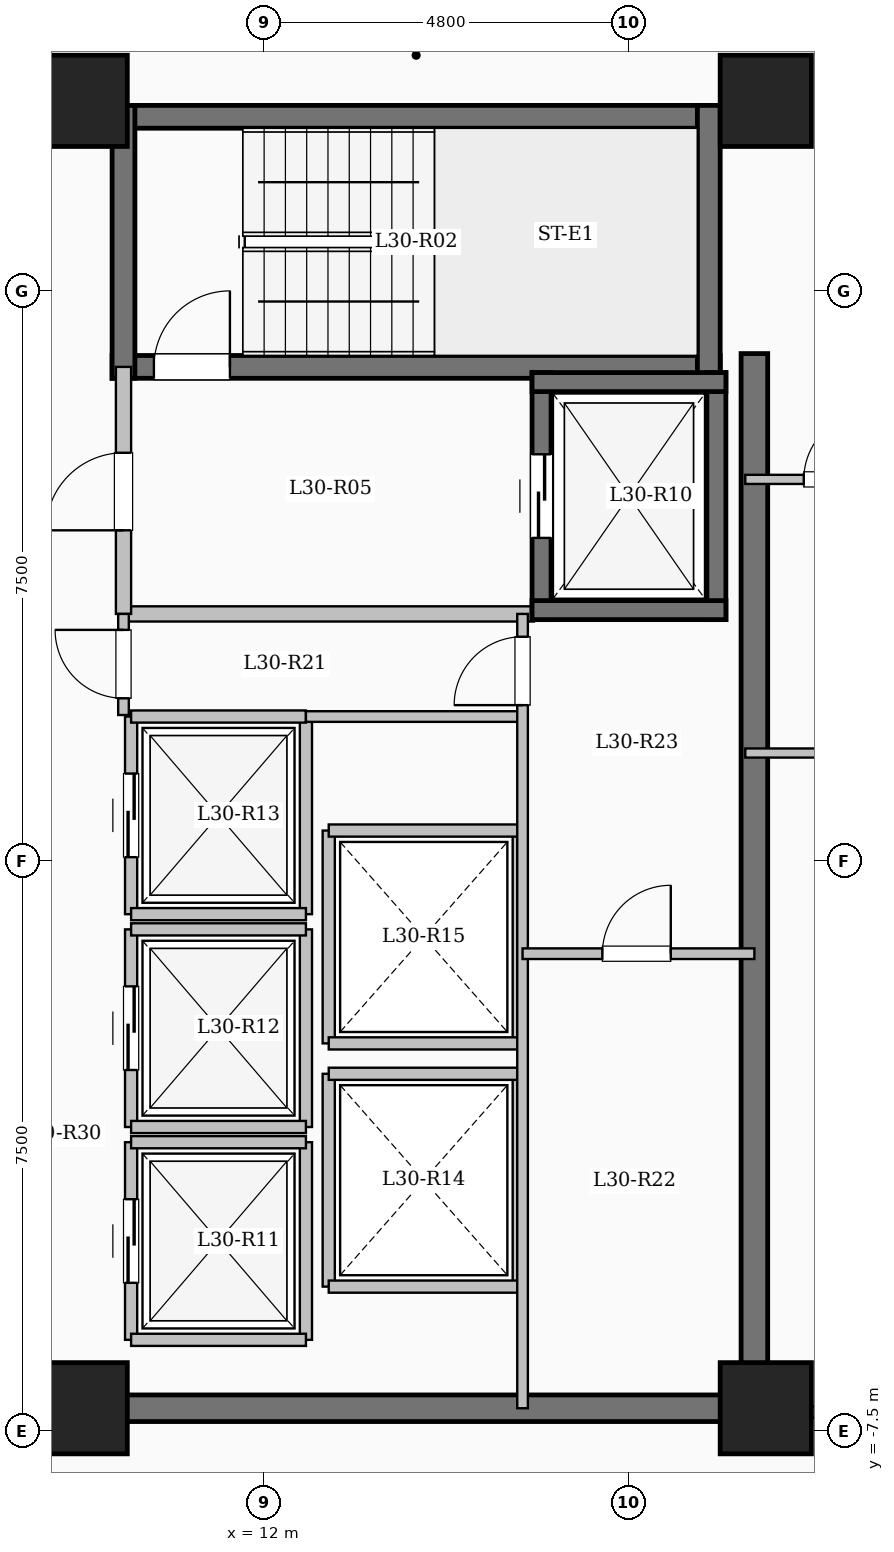
"""IFC4 building model, lengths in metres.
Left out: names, types, materials, properties, quantities, classifications, styles, units other than length and angle.
Written with IfcOpenShell. Run it as: python <this file> out.ifc"""

import sys

from ifc_helpers import new_model, si_unit, direction, frame, frame_2d, origin, origin_2d, place, context, subcontext, project, spatial, rectangle, extrude, element, fill, save


model = new_model("IFC4")
c1 = context("Model", 3, precision=1e-05, world=origin(), true_north=direction((0.0, 1.0)))
c2 = subcontext(c1, "Body", "Model", "MODEL_VIEW")
j1 = project(units=[si_unit("LENGTHUNIT", "METRE"), si_unit("PLANEANGLEUNIT", "RADIAN")], contexts=[c1])
p1 = place(None, origin())
s1 = spatial("IfcSite", under=j1, at=p1, CompositionType="ELEMENT")
p2 = place(p1, origin())
s2 = spatial("IfcBuilding", under=s1, at=p2, CompositionType="ELEMENT")
p3 = place(p2, frame((0.0, 0.0, 111.8)))
s3 = spatial("IfcBuildingStorey", under=s2, at=p3, CompositionType="ELEMENT", Elevation=111.8)
for number, where, z_axis, x_axis in (
    (1, (9.6, -7.2, 0.0), (0.0, 0.0, 1.0), (1.0, 0.0, 0.0)),
    (2, (9.6, 10.0, 0.0), (0.0, 0.0, 1.0), (1.0, 0.0, 0.0)),
    (3, (18.6, -7.2, 0.0), (0.0, 0.0, 1.0), (1.0, 0.0, 0.0)),
    (4, (18.6, 10.0, 0.0), (0.0, 0.0, 1.0), (1.0, 0.0, 0.0)),
):
    element("IfcColumn", number, at=place(p3, frame(where, z_axis=z_axis, x_axis=x_axis)), inside=s3, PredefinedType="COLUMN", context=c2, shape_type="SweptSolid", body=[
        extrude(rectangle(XDim=1.2, YDim=1.2, at=origin_2d()), origin(), (0.0, 0.0, 1.0), 3.35),
    ])
p4 = place(p3, frame((10.0, 9.79, 0.0), z_axis=(0.0, 0.0, 1.0), x_axis=(1.0, 0.0, 0.0)))
e5 = element("IfcWall", 5, at=p4, inside=s3, PredefinedType="SHEAR", context=c2, shape_type="SweptSolid", body=[
    extrude(rectangle(XDim=8.0, YDim=0.3, at=frame_2d((4.0, 0.0))), origin(), (0.0, 0.0, 1.0), 3.35),
])
p5 = place(p3, frame((10.0, 6.5, 0.0), z_axis=(0.0, 0.0, 1.0), x_axis=(1.0, 0.0, 0.0)))
e6 = element("IfcWall", 6, at=p5, inside=s3, PredefinedType="SHEAR", context=c2, shape_type="SweptSolid", body=[
    extrude(rectangle(XDim=8.0, YDim=0.3, at=frame_2d((4.0, 0.0))), origin(), (0.0, 0.0, 1.0), 3.35),
])
p6 = place(p5, frame((0.55, 0.0, 0.0)))
e7 = element("IfcOpeningElement", 7, at=p6, cuts=e6, PredefinedType="OPENING", context=c2, shape_type="SweptSolid", body=[
    extrude(rectangle(XDim=1.0, YDim=2.15, at=frame_2d((0.5, 1.075))), frame((0.0, 0.16, 0.0), z_axis=(0.0, -1.0, 0.0), x_axis=(1.0, 0.0, 0.0)), (0.0, 0.0, 1.0), 0.32),
])
for number, where, z_axis, x_axis in (
    (8, (10.15, 6.35, 0.0), (0.0, 0.0, 1.0), (0.0, 1.0, 0.0)),
    (9, (17.85, 6.35, 0.0), (0.0, 0.0, 1.0), (0.0, 1.0, 0.0)),
):
    element("IfcWall", number, at=place(p3, frame(where, z_axis=z_axis, x_axis=x_axis)), inside=s3, PredefinedType="SHEAR", context=c2, shape_type="SweptSolid", body=[
        extrude(rectangle(XDim=3.59, YDim=0.3, at=frame_2d((1.795, 0.0))), origin(), (0.0, 0.0, 1.0), 3.35),
    ])
p7 = place(p3, frame((10.15, 3.25, 0.0), z_axis=(0.0, 0.0, 1.0), x_axis=(1.0, 0.0, 0.0)))
e10 = element("IfcWall", 10, at=p7, inside=s3, PredefinedType="SOLIDWALL", context=c2, shape_type="SweptSolid", body=[
    extrude(rectangle(XDim=5.4, YDim=0.2, at=frame_2d((2.7, 0.0))), origin(), (0.0, 0.0, 1.0), 3.1),
])
p8 = place(p3, frame((10.15, 3.25, 0.0), z_axis=(0.0, 0.0, 1.0), x_axis=(0.0, 1.0, 0.0)))
e11 = element("IfcWall", 11, at=p8, inside=s3, PredefinedType="SOLIDWALL", context=c2, shape_type="SweptSolid", body=[
    extrude(rectangle(XDim=3.25, YDim=0.2, at=frame_2d((1.625, 0.0))), origin(), (0.0, 0.0, 1.0), 3.1),
])
p9 = place(p8, frame((1.1, 0.0, 0.0)))
e12 = element("IfcOpeningElement", 12, at=p9, cuts=e11, PredefinedType="OPENING", context=c2, shape_type="SweptSolid", body=[
    extrude(rectangle(XDim=1.02, YDim=2.15, at=frame_2d((0.51, 1.075))), frame((0.0, 0.11, 0.0), z_axis=(0.0, -1.0, 0.0), x_axis=(1.0, 0.0, 0.0)), (0.0, 0.0, 1.0), 0.22),
])
p10 = place(p3, frame((15.65, 3.175, 0.0), z_axis=(0.0, 0.0, 1.0), x_axis=(0.0, 1.0, 0.0)))
e13 = element("IfcWall", 13, at=p10, inside=s3, PredefinedType="SHEAR", context=c2, shape_type="SweptSolid", body=[
    extrude(rectangle(XDim=3.25, YDim=0.25, at=frame_2d((1.625, 0.0))), origin(), (0.0, 0.0, 1.0), 3.35),
])
p11 = place(p10, frame((1.075, 0.0, 0.0)))
e14 = element("IfcOpeningElement", 14, at=p11, cuts=e13, PredefinedType="OPENING", context=c2, shape_type="SweptSolid", body=[
    extrude(rectangle(XDim=1.1, YDim=2.15, at=frame_2d((0.55, 1.075))), frame((0.0, 0.135, 0.0), z_axis=(0.0, -1.0, 0.0), x_axis=(1.0, 0.0, 0.0)), (0.0, 0.0, 1.0), 0.27),
])
p12 = place(p3, frame((17.95, 3.175, 0.0), z_axis=(0.0, 0.0, 1.0), x_axis=(0.0, 1.0, 0.0)))
e15 = element("IfcWall", 15, at=p12, inside=s3, PredefinedType="SHEAR", context=c2, shape_type="SweptSolid", body=[
    extrude(rectangle(XDim=3.25, YDim=0.25, at=frame_2d((1.625, 0.0))), origin(), (0.0, 0.0, 1.0), 3.35),
])
for number, where, z_axis, x_axis in (
    (16, (15.525, 3.3, 0.0), (0.0, 0.0, 1.0), (1.0, 0.0, 0.0)),
    (17, (15.525, 6.3, 0.0), (0.0, 0.0, 1.0), (1.0, 0.0, 0.0)),
):
    element("IfcWall", number, at=place(p3, frame(where, z_axis=z_axis, x_axis=x_axis)), inside=s3, PredefinedType="SHEAR", context=c2, shape_type="SweptSolid", body=[
        extrude(rectangle(XDim=2.55, YDim=0.25, at=frame_2d((1.275, 0.0))), origin(), (0.0, 0.0, 1.0), 3.35),
    ])
p13 = place(p3, frame((10.25, -6.3, 0.0), z_axis=(0.0, 0.0, 1.0), x_axis=(0.0, 1.0, 0.0)))
e18 = element("IfcWall", 18, at=p13, inside=s3, PredefinedType="SOLIDWALL", context=c2, shape_type="SweptSolid", body=[
    extrude(rectangle(XDim=2.6, YDim=0.16, at=frame_2d((1.3, 0.0))), origin(), (0.0, 0.0, 1.0), 3.1),
])
p14 = place(p13, frame((0.75, 0.0, 0.0)))
e19 = element("IfcOpeningElement", 19, at=p14, cuts=e18, PredefinedType="OPENING", context=c2, shape_type="SweptSolid", body=[
    extrude(rectangle(XDim=1.1, YDim=2.15, at=frame_2d((0.55, 1.075))), frame((0.0, 0.09, 0.0), z_axis=(0.0, -1.0, 0.0), x_axis=(1.0, 0.0, 0.0)), (0.0, 0.0, 1.0), 0.18),
])
p15 = place(p3, frame((12.55, -6.3, 0.0), z_axis=(0.0, 0.0, 1.0), x_axis=(0.0, 1.0, 0.0)))
e20 = element("IfcWall", 20, at=p15, inside=s3, PredefinedType="SOLIDWALL", context=c2, shape_type="SweptSolid", body=[
    extrude(rectangle(XDim=2.6, YDim=0.16, at=frame_2d((1.3, 0.0))), origin(), (0.0, 0.0, 1.0), 3.1),
])
for number, where, z_axis, x_axis in (
    (21, (10.25, -6.3, 0.0), (0.0, 0.0, 1.0), (1.0, 0.0, 0.0)),
    (22, (10.25, -3.7, 0.0), (0.0, 0.0, 1.0), (1.0, 0.0, 0.0)),
):
    element("IfcWall", number, at=place(p3, frame(where, z_axis=z_axis, x_axis=x_axis)), inside=s3, PredefinedType="SOLIDWALL", context=c2, shape_type="SweptSolid", body=[
        extrude(rectangle(XDim=2.3, YDim=0.16, at=frame_2d((1.15, 0.0))), origin(), (0.0, 0.0, 1.0), 3.1),
    ])
p16 = place(p3, frame((10.25, -3.5, 0.0), z_axis=(0.0, 0.0, 1.0), x_axis=(0.0, 1.0, 0.0)))
e23 = element("IfcWall", 23, at=p16, inside=s3, PredefinedType="SOLIDWALL", context=c2, shape_type="SweptSolid", body=[
    extrude(rectangle(XDim=2.6, YDim=0.16, at=frame_2d((1.3, 0.0))), origin(), (0.0, 0.0, 1.0), 3.1),
])
p17 = place(p16, frame((0.75, 0.0, 0.0)))
e24 = element("IfcOpeningElement", 24, at=p17, cuts=e23, PredefinedType="OPENING", context=c2, shape_type="SweptSolid", body=[
    extrude(rectangle(XDim=1.1, YDim=2.15, at=frame_2d((0.55, 1.075))), frame((0.0, 0.09, 0.0), z_axis=(0.0, -1.0, 0.0), x_axis=(1.0, 0.0, 0.0)), (0.0, 0.0, 1.0), 0.18),
])
p18 = place(p3, frame((12.55, -3.5, 0.0), z_axis=(0.0, 0.0, 1.0), x_axis=(0.0, 1.0, 0.0)))
e25 = element("IfcWall", 25, at=p18, inside=s3, PredefinedType="SOLIDWALL", context=c2, shape_type="SweptSolid", body=[
    extrude(rectangle(XDim=2.6, YDim=0.16, at=frame_2d((1.3, 0.0))), origin(), (0.0, 0.0, 1.0), 3.1),
])
for number, where, z_axis, x_axis in (
    (26, (10.25, -3.5, 0.0), (0.0, 0.0, 1.0), (1.0, 0.0, 0.0)),
    (27, (10.25, -0.9, 0.0), (0.0, 0.0, 1.0), (1.0, 0.0, 0.0)),
):
    element("IfcWall", number, at=place(p3, frame(where, z_axis=z_axis, x_axis=x_axis)), inside=s3, PredefinedType="SOLIDWALL", context=c2, shape_type="SweptSolid", body=[
        extrude(rectangle(XDim=2.3, YDim=0.16, at=frame_2d((1.15, 0.0))), origin(), (0.0, 0.0, 1.0), 3.1),
    ])
p19 = place(p3, frame((10.25, -0.7, 0.0), z_axis=(0.0, 0.0, 1.0), x_axis=(0.0, 1.0, 0.0)))
e28 = element("IfcWall", 28, at=p19, inside=s3, PredefinedType="SOLIDWALL", context=c2, shape_type="SweptSolid", body=[
    extrude(rectangle(XDim=2.6, YDim=0.16, at=frame_2d((1.3, 0.0))), origin(), (0.0, 0.0, 1.0), 3.1),
])
p20 = place(p19, frame((0.75, 0.0, 0.0)))
e29 = element("IfcOpeningElement", 29, at=p20, cuts=e28, PredefinedType="OPENING", context=c2, shape_type="SweptSolid", body=[
    extrude(rectangle(XDim=1.1, YDim=2.15, at=frame_2d((0.55, 1.075))), frame((0.0, 0.09, 0.0), z_axis=(0.0, -1.0, 0.0), x_axis=(1.0, 0.0, 0.0)), (0.0, 0.0, 1.0), 0.18),
])
p21 = place(p3, frame((12.55, -0.7, 0.0), z_axis=(0.0, 0.0, 1.0), x_axis=(0.0, 1.0, 0.0)))
e30 = element("IfcWall", 30, at=p21, inside=s3, PredefinedType="SOLIDWALL", context=c2, shape_type="SweptSolid", body=[
    extrude(rectangle(XDim=2.6, YDim=0.16, at=frame_2d((1.3, 0.0))), origin(), (0.0, 0.0, 1.0), 3.1),
])
for number, where, z_axis, x_axis in (
    (31, (10.25, -0.7, 0.0), (0.0, 0.0, 1.0), (1.0, 0.0, 0.0)),
    (32, (10.25, 1.9, 0.0), (0.0, 0.0, 1.0), (1.0, 0.0, 0.0)),
):
    element("IfcWall", number, at=place(p3, frame(where, z_axis=z_axis, x_axis=x_axis)), inside=s3, PredefinedType="SOLIDWALL", context=c2, shape_type="SweptSolid", body=[
        extrude(rectangle(XDim=2.3, YDim=0.16, at=frame_2d((1.15, 0.0))), origin(), (0.0, 0.0, 1.0), 3.1),
    ])
for number, where, z_axis, x_axis in (
    (33, (12.85, -5.6, 0.0), (0.0, 0.0, 1.0), (0.0, 1.0, 0.0)),
    (34, (15.35, -5.6, 0.0), (0.0, 0.0, 1.0), (0.0, 1.0, 0.0)),
):
    element("IfcWall", number, at=place(p3, frame(where, z_axis=z_axis, x_axis=x_axis)), inside=s3, PredefinedType="SOLIDWALL", context=c2, shape_type="SweptSolid", body=[
        extrude(rectangle(XDim=2.8, YDim=0.16, at=frame_2d((1.4, 0.0))), origin(), (0.0, 0.0, 1.0), 3.1),
    ])
for number, where, z_axis, x_axis in (
    (35, (12.85, -5.6, 0.0), (0.0, 0.0, 1.0), (1.0, 0.0, 0.0)),
    (36, (12.85, -2.8, 0.0), (0.0, 0.0, 1.0), (1.0, 0.0, 0.0)),
):
    element("IfcWall", number, at=place(p3, frame(where, z_axis=z_axis, x_axis=x_axis)), inside=s3, PredefinedType="SOLIDWALL", context=c2, shape_type="SweptSolid", body=[
        extrude(rectangle(XDim=2.5, YDim=0.16, at=frame_2d((1.25, 0.0))), origin(), (0.0, 0.0, 1.0), 3.1),
    ])
for number, where, z_axis, x_axis in (
    (37, (12.85, -2.4, 0.0), (0.0, 0.0, 1.0), (0.0, 1.0, 0.0)),
    (38, (15.35, -2.4, 0.0), (0.0, 0.0, 1.0), (0.0, 1.0, 0.0)),
):
    element("IfcWall", number, at=place(p3, frame(where, z_axis=z_axis, x_axis=x_axis)), inside=s3, PredefinedType="SOLIDWALL", context=c2, shape_type="SweptSolid", body=[
        extrude(rectangle(XDim=2.8, YDim=0.16, at=frame_2d((1.4, 0.0))), origin(), (0.0, 0.0, 1.0), 3.1),
    ])
for number, where, z_axis, x_axis in (
    (39, (12.85, -2.4, 0.0), (0.0, 0.0, 1.0), (1.0, 0.0, 0.0)),
    (40, (12.85, 0.4, 0.0), (0.0, 0.0, 1.0), (1.0, 0.0, 0.0)),
):
    element("IfcWall", number, at=place(p3, frame(where, z_axis=z_axis, x_axis=x_axis)), inside=s3, PredefinedType="SOLIDWALL", context=c2, shape_type="SweptSolid", body=[
        extrude(rectangle(XDim=2.5, YDim=0.16, at=frame_2d((1.25, 0.0))), origin(), (0.0, 0.0, 1.0), 3.1),
    ])
p22 = place(p3, frame((18.45, -7.375, 0.0), z_axis=(0.0, 0.0, 1.0), x_axis=(0.0, 1.0, 0.0)))
e41 = element("IfcWall", 41, at=p22, inside=s3, PredefinedType="SHEAR", context=c2, shape_type="SweptSolid", body=[
    extrude(rectangle(XDim=14.05, YDim=0.35, at=frame_2d((7.025, 0.0))), origin(), (0.0, 0.0, 1.0), 3.35),
])
p23 = place(p3, frame((10.075, -7.2, 0.0), z_axis=(0.0, 0.0, 1.0), x_axis=(1.0, 0.0, 0.0)))
e42 = element("IfcWall", 42, at=p23, inside=s3, PredefinedType="SHEAR", context=c2, shape_type="SweptSolid", body=[
    extrude(rectangle(XDim=8.55, YDim=0.35, at=frame_2d((4.275, 0.0))), origin(), (0.0, 0.0, 1.0), 3.35),
])
p24 = place(p3, frame((12.55, 1.9, 0.0), z_axis=(0.0, 0.0, 1.0), x_axis=(1.0, 0.0, 0.0)))
e43 = element("IfcWall", 43, at=p24, inside=s3, PredefinedType="PARTITIONING", context=c2, shape_type="SweptSolid", body=[
    extrude(rectangle(XDim=2.85, YDim=0.14, at=frame_2d((1.425, 0.0))), origin(), (0.0, 0.0, 1.0), 3.1),
])
p25 = place(p3, frame((10.15, 1.92, 0.0), z_axis=(0.0, 0.0, 1.0), x_axis=(0.0, 1.0, 0.0)))
e44 = element("IfcWall", 44, at=p25, inside=s3, PredefinedType="PARTITIONING", context=c2, shape_type="SweptSolid", body=[
    extrude(rectangle(XDim=1.33, YDim=0.14, at=frame_2d((0.665, 0.0))), origin(), (0.0, 0.0, 1.0), 3.1),
])
p26 = place(p25, frame((0.22, 0.0, 0.0)))
e45 = element("IfcOpeningElement", 45, at=p26, cuts=e44, PredefinedType="OPENING", context=c2, shape_type="SweptSolid", body=[
    extrude(rectangle(XDim=0.9, YDim=2.08, at=frame_2d((0.45, 1.04))), frame((0.0, 0.08, 0.0), z_axis=(0.0, -1.0, 0.0), x_axis=(1.0, 0.0, 0.0)), (0.0, 0.0, 1.0), 0.16),
])
p27 = place(p3, frame((15.4, -7.2, 0.0), z_axis=(0.0, 0.0, 1.0), x_axis=(0.0, 1.0, 0.0)))
e46 = element("IfcWall", 46, at=p27, inside=s3, PredefinedType="PARTITIONING", context=c2, shape_type="SweptSolid", body=[
    extrude(rectangle(XDim=10.45, YDim=0.14, at=frame_2d((5.225, 0.0))), origin(), (0.0, 0.0, 1.0), 3.1),
])
p28 = place(p27, frame((9.25, 0.0, 0.0)))
e47 = element("IfcOpeningElement", 47, at=p28, cuts=e46, PredefinedType="OPENING", context=c2, shape_type="SweptSolid", body=[
    extrude(rectangle(XDim=0.9, YDim=2.08, at=frame_2d((0.45, 1.04))), frame((0.0, 0.08, 0.0), z_axis=(0.0, -1.0, 0.0), x_axis=(1.0, 0.0, 0.0)), (0.0, 0.0, 1.0), 0.16),
])
p29 = place(p3, frame((15.4, -1.22, 0.0), z_axis=(0.0, 0.0, 1.0), x_axis=(1.0, 0.0, 0.0)))
e48 = element("IfcWall", 48, at=p29, inside=s3, PredefinedType="PARTITIONING", context=c2, shape_type="SweptSolid", body=[
    extrude(rectangle(XDim=3.05, YDim=0.14, at=frame_2d((1.525, 0.0))), origin(), (0.0, 0.0, 1.0), 3.1),
])
p30 = place(p29, frame((1.05, 0.0, 0.0)))
e49 = element("IfcOpeningElement", 49, at=p30, cuts=e48, PredefinedType="OPENING", context=c2, shape_type="SweptSolid", body=[
    extrude(rectangle(XDim=0.9, YDim=2.08, at=frame_2d((0.45, 1.04))), frame((0.0, 0.08, 0.0), z_axis=(0.0, -1.0, 0.0), x_axis=(1.0, 0.0, 0.0)), (0.0, 0.0, 1.0), 0.16),
])
p31 = place(p3, frame((18.45, -7.25, 0.0), z_axis=(0.0, 0.0, 1.0), x_axis=(1.0, 0.0, 0.0)))
e50 = element("IfcWall", 50, at=p31, inside=s3, PredefinedType="PARTITIONING", context=c2, shape_type="SweptSolid", body=[
    extrude(rectangle(XDim=8.43, YDim=0.15, at=frame_2d((4.215, 0.0))), origin(), (0.0, 0.0, 1.0), 3.1),
])
p32 = place(p31, frame((1.95, 0.0, 0.0)))
e51 = element("IfcOpeningElement", 51, at=p32, cuts=e50, PredefinedType="OPENING", context=c2, shape_type="SweptSolid", body=[
    extrude(rectangle(XDim=0.96, YDim=2.15, at=frame_2d((0.48, 1.075))), frame((0.0, 0.085, 0.0), z_axis=(0.0, -1.0, 0.0), x_axis=(1.0, 0.0, 0.0)), (0.0, 0.0, 1.0), 0.17),
])
p33 = place(p3, frame((18.33, 1.42, 0.0), z_axis=(0.0, 0.0, 1.0), x_axis=(1.0, 0.0, 0.0)))
e52 = element("IfcWall", 52, at=p33, inside=s3, PredefinedType="PARTITIONING", context=c2, shape_type="SweptSolid", body=[
    extrude(rectangle(XDim=8.67, YDim=0.12, at=frame_2d((4.335, 0.0))), origin(), (0.0, 0.0, 1.0), 3.1),
])
p34 = place(p33, frame((1.863, 0.0, 0.0)))
e53 = element("IfcOpeningElement", 53, at=p34, cuts=e52, PredefinedType="OPENING", context=c2, shape_type="SweptSolid", body=[
    extrude(rectangle(XDim=0.88, YDim=2.1, at=frame_2d((0.44, 1.05))), frame((0.0, 0.07, 0.0), z_axis=(0.0, -1.0, 0.0), x_axis=(1.0, 0.0, 0.0)), (0.0, 0.0, 1.0), 0.14),
])
p35 = place(p33, frame((6.028, 0.0, 0.0)))
e54 = element("IfcOpeningElement", 54, at=p35, cuts=e52, PredefinedType="OPENING", context=c2, shape_type="SweptSolid", body=[
    extrude(rectangle(XDim=0.88, YDim=2.1, at=frame_2d((0.44, 1.05))), frame((0.0, 0.07, 0.0), z_axis=(0.0, -1.0, 0.0), x_axis=(1.0, 0.0, 0.0)), (0.0, 0.0, 1.0), 0.14),
])
p36 = place(p3, frame((18.33, 5.02, 0.0), z_axis=(0.0, 0.0, 1.0), x_axis=(1.0, 0.0, 0.0)))
e55 = element("IfcWall", 55, at=p36, inside=s3, PredefinedType="PARTITIONING", context=c2, shape_type="SweptSolid", body=[
    extrude(rectangle(XDim=8.67, YDim=0.12, at=frame_2d((4.335, 0.0))), origin(), (0.0, 0.0, 1.0), 3.1),
])
p37 = place(p36, frame((0.77, 0.0, 0.0)))
e56 = element("IfcOpeningElement", 56, at=p37, cuts=e55, PredefinedType="OPENING", context=c2, shape_type="SweptSolid", body=[
    extrude(rectangle(XDim=0.88, YDim=2.1, at=frame_2d((0.44, 1.05))), frame((0.0, 0.07, 0.0), z_axis=(0.0, -1.0, 0.0), x_axis=(1.0, 0.0, 0.0)), (0.0, 0.0, 1.0), 0.14),
])
p38 = place(p6, origin())
e57 = element("IfcDoor", 57, at=p38, inside=s3, OperationType="SINGLE_SWING_RIGHT", PredefinedType="DOOR", context=c2, shape_type="SweptSolid", body=[
    extrude(rectangle(XDim=1.0, YDim=2.15, at=frame_2d((0.5, 1.075))), frame((0.0, 0.025, 0.0), z_axis=(0.0, -1.0, 0.0), x_axis=(1.0, 0.0, 0.0)), (0.0, 0.0, 1.0), 0.05),
])
fill(e7, e57)
p39 = place(p9, origin())
e58 = element("IfcDoor", 58, at=p39, inside=s3, OperationType="SINGLE_SWING_LEFT", PredefinedType="DOOR", context=c2, shape_type="SweptSolid", body=[
    extrude(rectangle(XDim=1.02, YDim=2.15, at=frame_2d((0.51, 1.075))), frame((0.0, 0.025, 0.0), z_axis=(0.0, -1.0, 0.0), x_axis=(1.0, 0.0, 0.0)), (0.0, 0.0, 1.0), 0.05),
])
fill(e12, e58)
p40 = place(p11, origin())
e59 = element("IfcDoor", 59, at=p40, inside=s3, OperationType="SLIDING_TO_LEFT", PredefinedType="DOOR", context=c2, shape_type="SweptSolid", body=[
    extrude(rectangle(XDim=1.1, YDim=2.15, at=frame_2d((0.55, 1.075))), frame((0.0, 0.025, 0.0), z_axis=(0.0, -1.0, 0.0), x_axis=(1.0, 0.0, 0.0)), (0.0, 0.0, 1.0), 0.05),
])
fill(e14, e59)
p41 = place(p14, origin())
e60 = element("IfcDoor", 60, at=p41, inside=s3, OperationType="SLIDING_TO_LEFT", PredefinedType="DOOR", context=c2, shape_type="SweptSolid", body=[
    extrude(rectangle(XDim=1.1, YDim=2.15, at=frame_2d((0.55, 1.075))), frame((0.0, 0.025, 0.0), z_axis=(0.0, -1.0, 0.0), x_axis=(1.0, 0.0, 0.0)), (0.0, 0.0, 1.0), 0.05),
])
fill(e19, e60)
p42 = place(p17, origin())
e61 = element("IfcDoor", 61, at=p42, inside=s3, OperationType="SLIDING_TO_LEFT", PredefinedType="DOOR", context=c2, shape_type="SweptSolid", body=[
    extrude(rectangle(XDim=1.1, YDim=2.15, at=frame_2d((0.55, 1.075))), frame((0.0, 0.025, 0.0), z_axis=(0.0, -1.0, 0.0), x_axis=(1.0, 0.0, 0.0)), (0.0, 0.0, 1.0), 0.05),
])
fill(e24, e61)
p43 = place(p20, origin())
e62 = element("IfcDoor", 62, at=p43, inside=s3, OperationType="SLIDING_TO_LEFT", PredefinedType="DOOR", context=c2, shape_type="SweptSolid", body=[
    extrude(rectangle(XDim=1.1, YDim=2.15, at=frame_2d((0.55, 1.075))), frame((0.0, 0.025, 0.0), z_axis=(0.0, -1.0, 0.0), x_axis=(1.0, 0.0, 0.0)), (0.0, 0.0, 1.0), 0.05),
])
fill(e29, e62)
p44 = place(p26, origin())
e63 = element("IfcDoor", 63, at=p44, inside=s3, OperationType="SINGLE_SWING_RIGHT", PredefinedType="DOOR", context=c2, shape_type="SweptSolid", body=[
    extrude(rectangle(XDim=0.9, YDim=2.08, at=frame_2d((0.45, 1.04))), frame((0.0, 0.025, 0.0), z_axis=(0.0, -1.0, 0.0), x_axis=(1.0, 0.0, 0.0)), (0.0, 0.0, 1.0), 0.05),
])
fill(e45, e63)
p45 = place(p28, origin())
e64 = element("IfcDoor", 64, at=p45, inside=s3, OperationType="SINGLE_SWING_LEFT", PredefinedType="DOOR", context=c2, shape_type="SweptSolid", body=[
    extrude(rectangle(XDim=0.9, YDim=2.08, at=frame_2d((0.45, 1.04))), frame((0.0, 0.025, 0.0), z_axis=(0.0, -1.0, 0.0), x_axis=(1.0, 0.0, 0.0)), (0.0, 0.0, 1.0), 0.05),
])
fill(e47, e64)
p46 = place(p30, origin())
e65 = element("IfcDoor", 65, at=p46, inside=s3, OperationType="SINGLE_SWING_RIGHT", PredefinedType="DOOR", context=c2, shape_type="SweptSolid", body=[
    extrude(rectangle(XDim=0.9, YDim=2.08, at=frame_2d((0.45, 1.04))), frame((0.0, 0.025, 0.0), z_axis=(0.0, -1.0, 0.0), x_axis=(1.0, 0.0, 0.0)), (0.0, 0.0, 1.0), 0.05),
])
fill(e49, e65)
p47 = place(p37, origin())
e66 = element("IfcDoor", 66, at=p47, inside=s3, OperationType="SINGLE_SWING_RIGHT", PredefinedType="DOOR", context=c2, shape_type="SweptSolid", body=[
    extrude(rectangle(XDim=0.88, YDim=2.1, at=frame_2d((0.44, 1.05))), frame((0.0, 0.025, 0.0), z_axis=(0.0, -1.0, 0.0), x_axis=(1.0, 0.0, 0.0)), (0.0, 0.0, 1.0), 0.05),
])
fill(e56, e66)
save(model, sys.argv[1])
